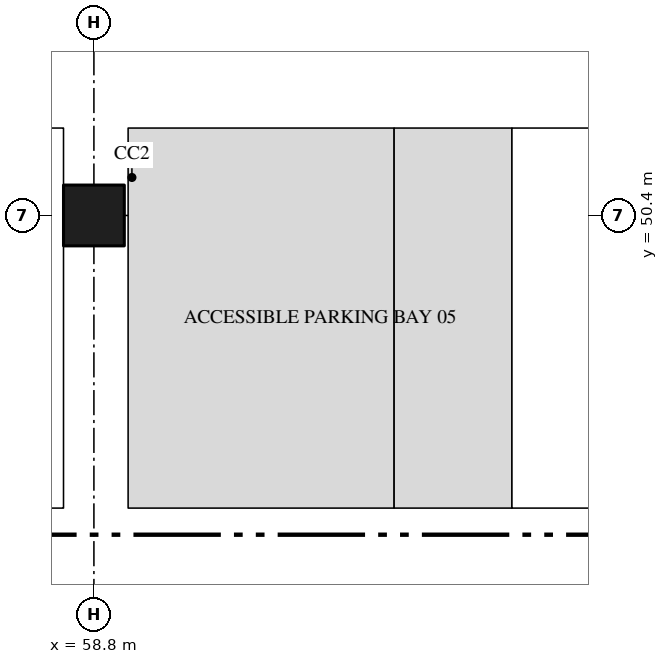
"""IFC4 building model, lengths in metres.
Left out: names, types, materials, properties, quantities, classifications, styles, units other than length and angle.
Written with IfcOpenShell. Run it as: python <this file> out.ifc"""

import sys

from ifc_helpers import new_model, si_unit, direction, frame, origin, origin_2d, place, context, subcontext, project, spatial, rectangle, extrude, element, save


model = new_model("IFC4")
c1 = context("Model", 3, precision=1e-05, world=origin(), true_north=direction((0.0, 1.0)))
c2 = subcontext(c1, "Body", "Model", "MODEL_VIEW")
j1 = project(units=[si_unit("LENGTHUNIT", "METRE"), si_unit("PLANEANGLEUNIT", "RADIAN")], contexts=[c1])
p1 = place(None, origin())
s1 = spatial("IfcSite", under=j1, at=p1, CompositionType="ELEMENT")
p2 = place(p1, origin())
s2 = spatial("IfcBuilding", under=s1, at=p2, CompositionType="ELEMENT")
p3 = place(p2, frame((0.0, 0.0, -4.5)))
s3 = spatial("IfcBuildingStorey", under=s2, at=p3, CompositionType="ELEMENT", Elevation=-4.5)
p4 = place(p3, frame((58.8, 50.4, 0.0), z_axis=(0.0, 0.0, 1.0), x_axis=(1.0, 0.0, 0.0)))
e1 = element("IfcColumn", 1, at=p4, inside=s3, PredefinedType="COLUMN", context=c2, shape_type="SweptSolid", body=[
    extrude(rectangle(XDim=0.8, YDim=0.8, at=origin_2d()), origin(), (0.0, 0.0, 1.0), 4.05),
])
save(model, sys.argv[1])
